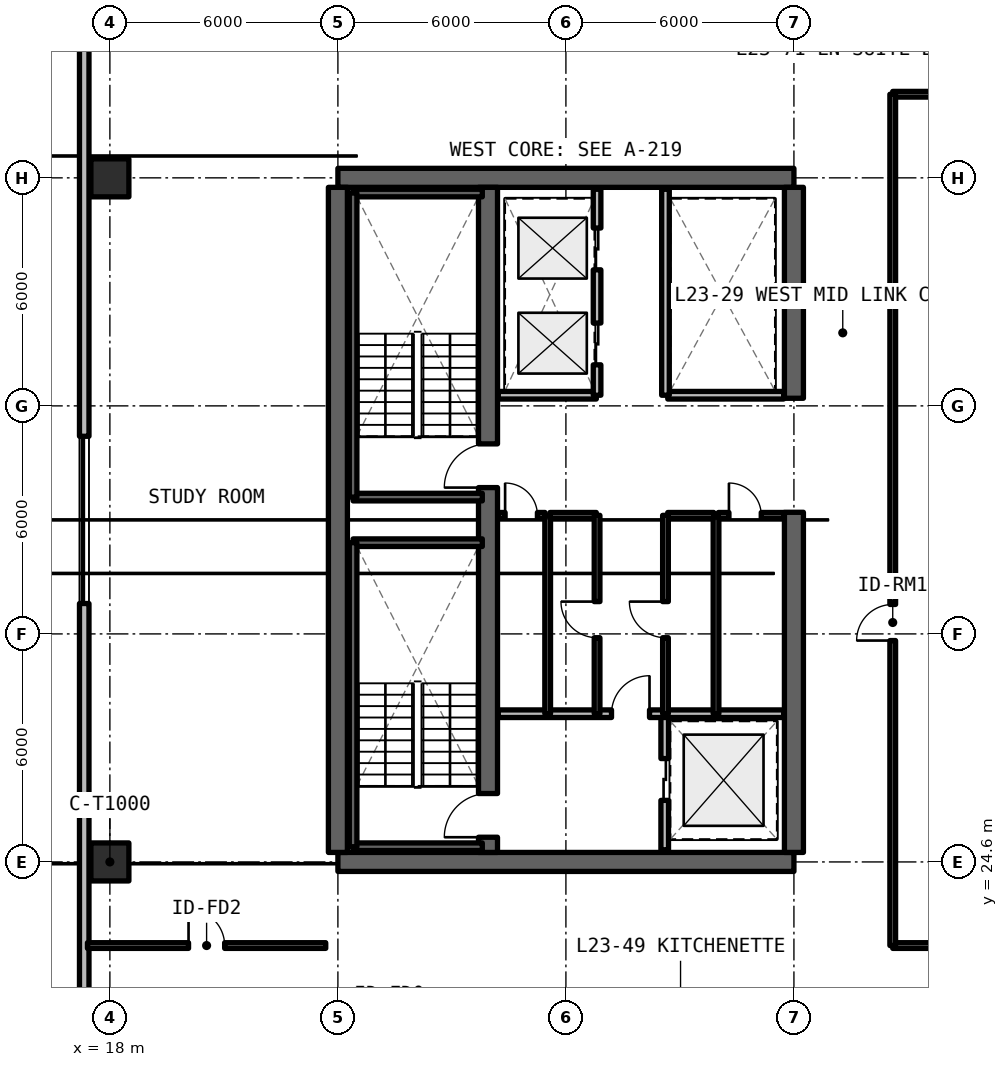
"""IFC4 building model, lengths in metres.
Left out: names, types, materials, properties, quantities, classifications, styles, units other than length and angle.
Written with IfcOpenShell. Run it as: python <this file> out.ifc"""

import sys

from ifc_helpers import new_model, si_unit, direction, frame, frame_2d, origin, origin_2d, place, context, subcontext, project, spatial, rectangle, extrude, element, fill, save


model = new_model("IFC4")
c1 = context("Model", 3, precision=1e-05, world=origin(), true_north=direction((0.0, 1.0)))
c2 = subcontext(c1, "Body", "Model", "MODEL_VIEW")
j1 = project(units=[si_unit("LENGTHUNIT", "METRE"), si_unit("PLANEANGLEUNIT", "RADIAN")], contexts=[c1])
p1 = place(None, origin())
s1 = spatial("IfcSite", under=j1, at=p1, CompositionType="ELEMENT")
p2 = place(p1, origin())
s2 = spatial("IfcBuilding", under=s1, at=p2, CompositionType="ELEMENT")
p3 = place(p2, frame((0.0, 0.0, 85.47)))
s3 = spatial("IfcBuildingStorey", under=s2, at=p3, CompositionType="ELEMENT", Elevation=85.47)
for number, where, z_axis, x_axis in (
    (1, (24.0, 24.6, 0.0), (0.0, 0.0, 1.0), (1.0, 0.0, 0.0)),
    (2, (36.0, 42.6, 0.0), (0.0, 0.0, 1.0), (-1.0, 0.0, 0.0)),
):
    element("IfcWall", number, at=place(p3, frame(where, z_axis=z_axis, x_axis=x_axis)), inside=s3, PredefinedType="SHEAR", context=c2, shape_type="SweptSolid", body=[
        extrude(rectangle(XDim=12.0, YDim=0.5, at=frame_2d((6.0, 0.0))), origin(), (0.0, 0.0, 1.0), 3.3),
    ])
p4 = place(p3, frame((24.0, 24.85, 0.0), z_axis=(0.0, 0.0, 1.0), x_axis=(0.0, 1.0, 0.0)))
e3 = element("IfcWall", 3, at=p4, inside=s3, PredefinedType="SHEAR", context=c2, shape_type="SweptSolid", body=[
    extrude(rectangle(XDim=17.5, YDim=0.5, at=frame_2d((8.75, 0.0))), origin(), (0.0, 0.0, 1.0), 3.3),
])
p5 = place(p3, frame((36.0, 24.85, 0.0), z_axis=(0.0, 0.0, 1.0), x_axis=(0.0, 1.0, 0.0)))
e4 = element("IfcWall", 4, at=p5, inside=s3, PredefinedType="SHEAR", context=c2, shape_type="SweptSolid", body=[
    extrude(rectangle(XDim=8.95, YDim=0.5, at=frame_2d((4.475, 0.0))), origin(), (0.0, 0.0, 1.0), 3.3),
])
p6 = place(p3, frame((36.0, 36.8, 0.0), z_axis=(0.0, 0.0, 1.0), x_axis=(0.0, 1.0, 0.0)))
e5 = element("IfcWall", 5, at=p6, inside=s3, PredefinedType="SHEAR", context=c2, shape_type="SweptSolid", body=[
    extrude(rectangle(XDim=5.55, YDim=0.5, at=frame_2d((2.775, 0.0))), origin(), (0.0, 0.0, 1.0), 3.3),
])
p7 = place(p3, frame((27.95, 24.85, 0.0), z_axis=(0.0, 0.0, 1.0), x_axis=(0.0, 1.0, 0.0)))
e6 = element("IfcWall", 6, at=p7, inside=s3, PredefinedType="SHEAR", context=c2, shape_type="SweptSolid", body=[
    extrude(rectangle(XDim=17.5, YDim=0.5, at=frame_2d((8.75, 0.0))), origin(), (0.0, 0.0, 1.0), 3.3),
])
p8 = place(p7, frame((0.4, 0.0, 0.0)))
e7 = element("IfcOpeningElement", 7, at=p8, cuts=e6, PredefinedType="OPENING", context=c2, shape_type="SweptSolid", body=[
    extrude(rectangle(XDim=1.15, YDim=2.15, at=frame_2d((0.575, 1.075))), frame((0.0, 0.26, 0.0), z_axis=(0.0, -1.0, 0.0), x_axis=(1.0, 0.0, 0.0)), (0.0, 0.0, 1.0), 0.52),
])
p9 = place(p7, frame((9.6, 0.0, 0.0)))
e8 = element("IfcOpeningElement", 8, at=p9, cuts=e6, PredefinedType="OPENING", context=c2, shape_type="SweptSolid", body=[
    extrude(rectangle(XDim=1.15, YDim=2.15, at=frame_2d((0.575, 1.075))), frame((0.0, 0.26, 0.0), z_axis=(0.0, -1.0, 0.0), x_axis=(1.0, 0.0, 0.0)), (0.0, 0.0, 1.0), 0.52),
])
for number, where, z_axis, x_axis in (
    (9, (18.0, 24.6, 0.0), (0.0, 0.0, 1.0), (1.0, 0.0, 0.0)),
    (10, (18.0, 42.6, 0.0), (0.0, 0.0, 1.0), (1.0, 0.0, 0.0)),
):
    element("IfcColumn", number, at=place(p3, frame(where, z_axis=z_axis, x_axis=x_axis)), inside=s3, PredefinedType="COLUMN", context=c2, shape_type="SweptSolid", body=[
        extrude(rectangle(XDim=1.0, YDim=1.0, at=origin_2d()), origin(), (0.0, 0.0, 1.0), 3.3),
    ])
p10 = place(p3, frame((17.325, 53.348, 0.0), z_axis=(0.0, 0.0, 1.0), x_axis=(0.0, -1.0, 0.0)))
e11 = element("IfcWall", 11, at=p10, inside=s3, PredefinedType="SOLIDWALL", context=c2, shape_type="SweptSolid", body=[
    extrude(rectangle(XDim=39.496, YDim=0.25, at=frame_2d((19.748, 0.0))), origin(), (0.0, 0.0, 1.0), 3.08),
])
p11 = place(p10, frame((1.698, 0.0, 0.0)))
e12 = element("IfcOpeningElement", 12, at=p11, cuts=e11, PredefinedType="OPENING", context=c2, shape_type="SweptSolid", body=[
    extrude(rectangle(XDim=1.1, YDim=2.15, at=frame_2d((0.55, 1.075))), frame((0.0, 0.135, 0.0), z_axis=(0.0, -1.0, 0.0), x_axis=(1.0, 0.0, 0.0)), (0.0, 0.0, 1.0), 0.27),
])
p12 = place(p10, frame((17.548, 0.0, 0.78)))
e13 = element("IfcOpeningElement", 13, at=p12, cuts=e11, PredefinedType="OPENING", context=c2, shape_type="SweptSolid", body=[
    extrude(rectangle(XDim=4.4, YDim=1.66, at=frame_2d((2.2, 0.83))), frame((0.0, 0.135, 0.0), z_axis=(0.0, -1.0, 0.0), x_axis=(1.0, 0.0, 0.0)), (0.0, 0.0, 1.0), 0.27),
])
p13 = place(p10, frame((35.642, 0.0, 0.78)))
e14 = element("IfcOpeningElement", 14, at=p13, cuts=e11, PredefinedType="OPENING", context=c2, shape_type="SweptSolid", body=[
    extrude(rectangle(XDim=1.4, YDim=1.65, at=frame_2d((0.7, 0.825))), frame((0.0, 0.135, 0.0), z_axis=(0.0, -1.0, 0.0), x_axis=(1.0, 0.0, 0.0)), (0.0, 0.0, 1.0), 0.27),
])
p14 = place(p3, frame((32.6, 24.92, 0.0), z_axis=(0.0, 0.0, 1.0), x_axis=(0.0, 1.0, 0.0)))
e15 = element("IfcWall", 15, at=p14, inside=s3, PredefinedType="SOLIDWALL", context=c2, shape_type="SweptSolid", body=[
    extrude(rectangle(XDim=3.58, YDim=0.2, at=frame_2d((1.79, 0.0))), origin(), (0.0, 0.0, 1.0), 2.35),
])
p15 = place(p14, frame((1.3, 0.0, 0.0)))
e16 = element("IfcOpeningElement", 16, at=p15, cuts=e15, PredefinedType="OPENING", context=c2, shape_type="SweptSolid", body=[
    extrude(rectangle(XDim=1.1, YDim=2.2, at=frame_2d((0.55, 1.1))), frame((0.0, 0.11, 0.0), z_axis=(0.0, -1.0, 0.0), x_axis=(1.0, 0.0, 0.0)), (0.0, 0.0, 1.0), 0.22),
])
p16 = place(p3, frame((28.22, 28.5, 0.0), z_axis=(0.0, 0.0, 1.0), x_axis=(1.0, 0.0, 0.0)))
e17 = element("IfcWall", 17, at=p16, inside=s3, PredefinedType="SOLIDWALL", context=c2, shape_type="SweptSolid", body=[
    extrude(rectangle(XDim=7.51, YDim=0.2, at=frame_2d((3.755, 0.0))), origin(), (0.0, 0.0, 1.0), 2.35),
])
p17 = place(p16, frame((2.98, 0.0, 0.0)))
e18 = element("IfcOpeningElement", 18, at=p17, cuts=e17, PredefinedType="OPENING", context=c2, shape_type="SweptSolid", body=[
    extrude(rectangle(XDim=1.0, YDim=2.15, at=frame_2d((0.5, 1.075))), frame((0.0, 0.11, 0.0), z_axis=(0.0, -1.0, 0.0), x_axis=(1.0, 0.0, 0.0)), (0.0, 0.0, 1.0), 0.22),
])
p18 = place(p3, frame((29.52, 28.5, 0.0), z_axis=(0.0, 0.0, 1.0), x_axis=(0.0, 1.0, 0.0)))
e19 = element("IfcWall", 19, at=p18, inside=s3, PredefinedType="SOLIDWALL", context=c2, shape_type="SweptSolid", body=[
    extrude(rectangle(XDim=5.22, YDim=0.15, at=frame_2d((2.61, 0.0))), origin(), (0.0, 0.0, 1.0), 2.35),
])
p19 = place(p3, frame((28.22, 33.72, 0.0), z_axis=(0.0, 0.0, 1.0), x_axis=(1.0, 0.0, 0.0)))
e20 = element("IfcWall", 20, at=p19, inside=s3, PredefinedType="SOLIDWALL", context=c2, shape_type="SweptSolid", body=[
    extrude(rectangle(XDim=1.23, YDim=0.15, at=frame_2d((0.615, 0.0))), origin(), (0.0, 0.0, 1.0), 2.35),
])
p20 = place(p19, frame((0.18, 0.0, 0.0)))
e21 = element("IfcOpeningElement", 21, at=p20, cuts=e20, PredefinedType="OPENING", context=c2, shape_type="SweptSolid", body=[
    extrude(rectangle(XDim=0.85, YDim=2.1, at=frame_2d((0.425, 1.05))), frame((0.0, 0.085, 0.0), z_axis=(0.0, -1.0, 0.0), x_axis=(1.0, 0.0, 0.0)), (0.0, 0.0, 1.0), 0.17),
])
p21 = place(p3, frame((29.58, 33.72, 0.0), z_axis=(0.0, 0.0, 1.0), x_axis=(1.0, 0.0, 0.0)))
e22 = element("IfcWall", 22, at=p21, inside=s3, PredefinedType="SOLIDWALL", context=c2, shape_type="SweptSolid", body=[
    extrude(rectangle(XDim=1.22, YDim=0.15, at=frame_2d((0.61, 0.0))), origin(), (0.0, 0.0, 1.0), 2.35),
])
p22 = place(p3, frame((30.82, 28.5, 0.0), z_axis=(0.0, 0.0, 1.0), x_axis=(0.0, 1.0, 0.0)))
e23 = element("IfcWall", 23, at=p22, inside=s3, PredefinedType="SOLIDWALL", context=c2, shape_type="SweptSolid", body=[
    extrude(rectangle(XDim=5.22, YDim=0.15, at=frame_2d((2.61, 0.0))), origin(), (0.0, 0.0, 1.0), 2.35),
])
p23 = place(p22, frame((2.0, 0.0, 0.0)))
e24 = element("IfcOpeningElement", 24, at=p23, cuts=e23, PredefinedType="OPENING", context=c2, shape_type="SweptSolid", body=[
    extrude(rectangle(XDim=0.95, YDim=2.15, at=frame_2d((0.475, 1.075))), frame((0.0, 0.085, 0.0), z_axis=(0.0, -1.0, 0.0), x_axis=(1.0, 0.0, 0.0)), (0.0, 0.0, 1.0), 0.17),
])
p24 = place(p3, frame((33.95, 28.5, 0.0), z_axis=(0.0, 0.0, 1.0), x_axis=(0.0, 1.0, 0.0)))
e25 = element("IfcWall", 25, at=p24, inside=s3, PredefinedType="SOLIDWALL", context=c2, shape_type="SweptSolid", body=[
    extrude(rectangle(XDim=5.22, YDim=0.15, at=frame_2d((2.61, 0.0))), origin(), (0.0, 0.0, 1.0), 2.35),
])
p25 = place(p3, frame((32.68, 33.72, 0.0), z_axis=(0.0, 0.0, 1.0), x_axis=(1.0, 0.0, 0.0)))
e26 = element("IfcWall", 26, at=p25, inside=s3, PredefinedType="SOLIDWALL", context=c2, shape_type="SweptSolid", body=[
    extrude(rectangle(XDim=1.21, YDim=0.15, at=frame_2d((0.605, 0.0))), origin(), (0.0, 0.0, 1.0), 2.35),
])
p26 = place(p3, frame((34.01, 33.72, 0.0), z_axis=(0.0, 0.0, 1.0), x_axis=(1.0, 0.0, 0.0)))
e27 = element("IfcWall", 27, at=p26, inside=s3, PredefinedType="SOLIDWALL", context=c2, shape_type="SweptSolid", body=[
    extrude(rectangle(XDim=1.72, YDim=0.15, at=frame_2d((0.86, 0.0))), origin(), (0.0, 0.0, 1.0), 2.35),
])
p27 = place(p26, frame((0.28, 0.0, 0.0)))
e28 = element("IfcOpeningElement", 28, at=p27, cuts=e27, PredefinedType="OPENING", context=c2, shape_type="SweptSolid", body=[
    extrude(rectangle(XDim=0.85, YDim=2.1, at=frame_2d((0.425, 1.05))), frame((0.0, 0.085, 0.0), z_axis=(0.0, -1.0, 0.0), x_axis=(1.0, 0.0, 0.0)), (0.0, 0.0, 1.0), 0.17),
])
p28 = place(p3, frame((32.62, 28.5, 0.0), z_axis=(0.0, 0.0, 1.0), x_axis=(0.0, 1.0, 0.0)))
e29 = element("IfcWall", 29, at=p28, inside=s3, PredefinedType="SOLIDWALL", context=c2, shape_type="SweptSolid", body=[
    extrude(rectangle(XDim=5.22, YDim=0.15, at=frame_2d((2.61, 0.0))), origin(), (0.0, 0.0, 1.0), 2.35),
])
p29 = place(p28, frame((2.0, 0.0, 0.0)))
e30 = element("IfcOpeningElement", 30, at=p29, cuts=e29, PredefinedType="OPENING", context=c2, shape_type="SweptSolid", body=[
    extrude(rectangle(XDim=0.95, YDim=2.15, at=frame_2d((0.475, 1.075))), frame((0.0, 0.085, 0.0), z_axis=(0.0, -1.0, 0.0), x_axis=(1.0, 0.0, 0.0)), (0.0, 0.0, 1.0), 0.17),
])
p30 = place(p3, frame((28.22, 36.88, 0.0), z_axis=(0.0, 0.0, 1.0), x_axis=(1.0, 0.0, 0.0)))
e31 = element("IfcWall", 31, at=p30, inside=s3, PredefinedType="SOLIDWALL", context=c2, shape_type="SweptSolid", body=[
    extrude(rectangle(XDim=2.58, YDim=0.2, at=frame_2d((1.29, 0.0))), origin(), (0.0, 0.0, 1.0), 2.35),
])
p31 = place(p3, frame((30.82, 36.88, 0.0), z_axis=(0.0, 0.0, 1.0), x_axis=(0.0, 1.0, 0.0)))
e32 = element("IfcWall", 32, at=p31, inside=s3, PredefinedType="SOLIDWALL", context=c2, shape_type="SweptSolid", body=[
    extrude(rectangle(XDim=5.42, YDim=0.2, at=frame_2d((2.71, 0.0))), origin(), (0.0, 0.0, 1.0), 2.35),
])
p32 = place(p31, frame((0.8, 0.0, 0.0)))
e33 = element("IfcOpeningElement", 33, at=p32, cuts=e32, PredefinedType="OPENING", context=c2, shape_type="SweptSolid", body=[
    extrude(rectangle(XDim=1.1, YDim=2.2, at=frame_2d((0.55, 1.1))), frame((0.0, 0.11, 0.0), z_axis=(0.0, -1.0, 0.0), x_axis=(1.0, 0.0, 0.0)), (0.0, 0.0, 1.0), 0.22),
])
p33 = place(p31, frame((3.3, 0.0, 0.0)))
e34 = element("IfcOpeningElement", 34, at=p33, cuts=e32, PredefinedType="OPENING", context=c2, shape_type="SweptSolid", body=[
    extrude(rectangle(XDim=1.1, YDim=2.2, at=frame_2d((0.55, 1.1))), frame((0.0, 0.11, 0.0), z_axis=(0.0, -1.0, 0.0), x_axis=(1.0, 0.0, 0.0)), (0.0, 0.0, 1.0), 0.22),
])
p34 = place(p3, frame((32.68, 36.88, 0.0), z_axis=(0.0, 0.0, 1.0), x_axis=(1.0, 0.0, 0.0)))
e35 = element("IfcWall", 35, at=p34, inside=s3, PredefinedType="SOLIDWALL", context=c2, shape_type="SweptSolid", body=[
    extrude(rectangle(XDim=3.05, YDim=0.2, at=frame_2d((1.525, 0.0))), origin(), (0.0, 0.0, 1.0), 2.35),
])
p35 = place(p3, frame((32.62, 36.88, 0.0), z_axis=(0.0, 0.0, 1.0), x_axis=(0.0, 1.0, 0.0)))
e36 = element("IfcWall", 36, at=p35, inside=s3, PredefinedType="SOLIDWALL", context=c2, shape_type="SweptSolid", body=[
    extrude(rectangle(XDim=5.42, YDim=0.2, at=frame_2d((2.71, 0.0))), origin(), (0.0, 0.0, 1.0), 2.35),
])
for number, where, z_axis, x_axis in (
    (37, (38.6, 22.4, 0.0), (0.0, 0.0, 1.0), (1.0, 0.0, 0.0)),
    (38, (38.6, 44.8, 0.0), (0.0, 0.0, 1.0), (1.0, 0.0, 0.0)),
):
    element("IfcWall", number, at=place(p3, frame(where, z_axis=z_axis, x_axis=x_axis)), inside=s3, PredefinedType="SOLIDWALL", context=c2, shape_type="SweptSolid", body=[
        extrude(rectangle(XDim=8.25, YDim=0.15, at=frame_2d((4.125, 0.0))), origin(), (0.0, 0.0, 1.0), 2.35),
    ])
p36 = place(p3, frame((38.6, 22.4, 0.0), z_axis=(0.0, 0.0, 1.0), x_axis=(0.0, 1.0, 0.0)))
e39 = element("IfcWall", 39, at=p36, inside=s3, PredefinedType="SOLIDWALL", context=c2, shape_type="SweptSolid", body=[
    extrude(rectangle(XDim=22.4, YDim=0.15, at=frame_2d((11.2, 0.0))), origin(), (0.0, 0.0, 1.0), 2.35),
])
p37 = place(p36, frame((8.025, 0.0, 0.0)))
e40 = element("IfcOpeningElement", 40, at=p37, cuts=e39, PredefinedType="OPENING", context=c2, shape_type="SweptSolid", body=[
    extrude(rectangle(XDim=0.95, YDim=2.15, at=frame_2d((0.475, 1.075))), frame((0.0, 0.085, 0.0), z_axis=(0.0, -1.0, 0.0), x_axis=(1.0, 0.0, 0.0)), (0.0, 0.0, 1.0), 0.17),
])
p38 = place(p3, frame((17.41, 22.4, 0.0), z_axis=(0.0, 0.0, 1.0), x_axis=(1.0, 0.0, 0.0)))
e41 = element("IfcWall", 41, at=p38, inside=s3, PredefinedType="SOLIDWALL", context=c2, shape_type="SweptSolid", body=[
    extrude(rectangle(XDim=6.27, YDim=0.15, at=frame_2d((3.135, 0.0))), origin(), (0.0, 0.0, 1.0), 2.35),
])
p39 = place(p38, frame((2.66, 0.0, 0.0)))
e42 = element("IfcOpeningElement", 42, at=p39, cuts=e41, PredefinedType="OPENING", context=c2, shape_type="SweptSolid", body=[
    extrude(rectangle(XDim=0.95, YDim=2.15, at=frame_2d((0.475, 1.075))), frame((0.0, 0.085, 0.0), z_axis=(0.0, -1.0, 0.0), x_axis=(1.0, 0.0, 0.0)), (0.0, 0.0, 1.0), 0.17),
])
for number, where, z_axis, x_axis in (
    (43, (24.4, 25.0, 0.0), (0.0, 0.0, 1.0), (1.0, 0.0, 0.0)),
    (44, (27.8, 33.0, 0.0), (0.0, 0.0, 1.0), (-1.0, 0.0, 0.0)),
):
    element("IfcWall", number, at=place(p3, frame(where, z_axis=z_axis, x_axis=x_axis)), inside=s3, PredefinedType="SOLIDWALL", context=c2, shape_type="SweptSolid", body=[
        extrude(rectangle(XDim=3.4, YDim=0.2, at=frame_2d((1.7, 0.0))), origin(), (0.0, 0.0, 1.0), 3.3),
    ])
p40 = place(p3, frame((24.4, 33.0, 0.0), z_axis=(0.0, 0.0, 1.0), x_axis=(0.0, -1.0, 0.0)))
e45 = element("IfcWall", 45, at=p40, inside=s3, PredefinedType="SOLIDWALL", context=c2, shape_type="SweptSolid", body=[
    extrude(rectangle(XDim=8.0, YDim=0.2, at=frame_2d((4.0, 0.0))), origin(), (0.0, 0.0, 1.0), 3.3),
])
for number, where, z_axis, x_axis in (
    (46, (24.4, 34.2, 0.0), (0.0, 0.0, 1.0), (1.0, 0.0, 0.0)),
    (47, (27.8, 42.2, 0.0), (0.0, 0.0, 1.0), (-1.0, 0.0, 0.0)),
):
    element("IfcWall", number, at=place(p3, frame(where, z_axis=z_axis, x_axis=x_axis)), inside=s3, PredefinedType="SOLIDWALL", context=c2, shape_type="SweptSolid", body=[
        extrude(rectangle(XDim=3.4, YDim=0.2, at=frame_2d((1.7, 0.0))), origin(), (0.0, 0.0, 1.0), 3.3),
    ])
p41 = place(p3, frame((24.4, 42.2, 0.0), z_axis=(0.0, 0.0, 1.0), x_axis=(0.0, -1.0, 0.0)))
e48 = element("IfcWall", 48, at=p41, inside=s3, PredefinedType="SOLIDWALL", context=c2, shape_type="SweptSolid", body=[
    extrude(rectangle(XDim=8.0, YDim=0.2, at=frame_2d((4.0, 0.0))), origin(), (0.0, 0.0, 1.0), 3.3),
])
p42 = place(p12, origin())
e49 = element("IfcWindow", 49, at=p42, inside=s3, PartitioningType="SINGLE_PANEL", PredefinedType="WINDOW", context=c2, shape_type="SweptSolid", body=[
    extrude(rectangle(XDim=4.4, YDim=1.66, at=frame_2d((2.2, 0.83))), frame((0.0, 0.03, 0.0), z_axis=(0.0, -1.0, 0.0), x_axis=(1.0, 0.0, 0.0)), (0.0, 0.0, 1.0), 0.06),
])
fill(e13, e49)
p43 = place(p15, origin())
e50 = element("IfcDoor", 50, at=p43, inside=s3, OperationType="SLIDING_TO_LEFT", PredefinedType="DOOR", context=c2, shape_type="SweptSolid", body=[
    extrude(rectangle(XDim=1.1, YDim=2.2, at=frame_2d((0.55, 1.1))), frame((0.0, 0.025, 0.0), z_axis=(0.0, -1.0, 0.0), x_axis=(1.0, 0.0, 0.0)), (0.0, 0.0, 1.0), 0.05),
])
fill(e16, e50)
p44 = place(p17, origin())
e51 = element("IfcDoor", 51, at=p44, inside=s3, OperationType="SINGLE_SWING_RIGHT", PredefinedType="DOOR", context=c2, shape_type="SweptSolid", body=[
    extrude(rectangle(XDim=1.0, YDim=2.15, at=frame_2d((0.5, 1.075))), frame((0.0, 0.025, 0.0), z_axis=(0.0, -1.0, 0.0), x_axis=(1.0, 0.0, 0.0)), (0.0, 0.0, 1.0), 0.05),
])
fill(e18, e51)
p45 = place(p20, origin())
e52 = element("IfcDoor", 52, at=p45, inside=s3, OperationType="SINGLE_SWING_LEFT", PredefinedType="DOOR", context=c2, shape_type="SweptSolid", body=[
    extrude(rectangle(XDim=0.85, YDim=2.1, at=frame_2d((0.425, 1.05))), frame((0.0, 0.025, 0.0), z_axis=(0.0, -1.0, 0.0), x_axis=(1.0, 0.0, 0.0)), (0.0, 0.0, 1.0), 0.05),
])
fill(e21, e52)
p46 = place(p23, origin())
e53 = element("IfcDoor", 53, at=p46, inside=s3, OperationType="SINGLE_SWING_RIGHT", PredefinedType="DOOR", context=c2, shape_type="SweptSolid", body=[
    extrude(rectangle(XDim=0.95, YDim=2.15, at=frame_2d((0.475, 1.075))), frame((0.0, 0.025, 0.0), z_axis=(0.0, -1.0, 0.0), x_axis=(1.0, 0.0, 0.0)), (0.0, 0.0, 1.0), 0.05),
])
fill(e24, e53)
p47 = place(p27, origin())
e54 = element("IfcDoor", 54, at=p47, inside=s3, OperationType="SINGLE_SWING_LEFT", PredefinedType="DOOR", context=c2, shape_type="SweptSolid", body=[
    extrude(rectangle(XDim=0.85, YDim=2.1, at=frame_2d((0.425, 1.05))), frame((0.0, 0.025, 0.0), z_axis=(0.0, -1.0, 0.0), x_axis=(1.0, 0.0, 0.0)), (0.0, 0.0, 1.0), 0.05),
])
fill(e28, e54)
p48 = place(p29, origin())
e55 = element("IfcDoor", 55, at=p48, inside=s3, OperationType="SINGLE_SWING_RIGHT", PredefinedType="DOOR", context=c2, shape_type="SweptSolid", body=[
    extrude(rectangle(XDim=0.95, YDim=2.15, at=frame_2d((0.475, 1.075))), frame((0.0, 0.025, 0.0), z_axis=(0.0, -1.0, 0.0), x_axis=(1.0, 0.0, 0.0)), (0.0, 0.0, 1.0), 0.05),
])
fill(e30, e55)
p49 = place(p32, origin())
e56 = element("IfcDoor", 56, at=p49, inside=s3, OperationType="SLIDING_TO_LEFT", PredefinedType="DOOR", context=c2, shape_type="SweptSolid", body=[
    extrude(rectangle(XDim=1.1, YDim=2.2, at=frame_2d((0.55, 1.1))), frame((0.0, 0.025, 0.0), z_axis=(0.0, -1.0, 0.0), x_axis=(1.0, 0.0, 0.0)), (0.0, 0.0, 1.0), 0.05),
])
fill(e33, e56)
p50 = place(p33, origin())
e57 = element("IfcDoor", 57, at=p50, inside=s3, OperationType="SLIDING_TO_RIGHT", PredefinedType="DOOR", context=c2, shape_type="SweptSolid", body=[
    extrude(rectangle(XDim=1.1, YDim=2.2, at=frame_2d((0.55, 1.1))), frame((0.0, 0.025, 0.0), z_axis=(0.0, -1.0, 0.0), x_axis=(1.0, 0.0, 0.0)), (0.0, 0.0, 1.0), 0.05),
])
fill(e34, e57)
p51 = place(p37, origin())
e58 = element("IfcDoor", 58, at=p51, inside=s3, OperationType="SINGLE_SWING_LEFT", PredefinedType="DOOR", context=c2, shape_type="SweptSolid", body=[
    extrude(rectangle(XDim=0.95, YDim=2.15, at=frame_2d((0.475, 1.075))), frame((0.0, 0.025, 0.0), z_axis=(0.0, -1.0, 0.0), x_axis=(1.0, 0.0, 0.0)), (0.0, 0.0, 1.0), 0.05),
])
fill(e40, e58)
p52 = place(p39, origin())
e59 = element("IfcDoor", 59, at=p52, inside=s3, OperationType="SINGLE_SWING_LEFT", PredefinedType="DOOR", context=c2, shape_type="SweptSolid", body=[
    extrude(rectangle(XDim=0.95, YDim=2.15, at=frame_2d((0.475, 1.075))), frame((0.0, 0.025, 0.0), z_axis=(0.0, -1.0, 0.0), x_axis=(1.0, 0.0, 0.0)), (0.0, 0.0, 1.0), 0.05),
])
fill(e42, e59)
p53 = place(p8, origin())
e60 = element("IfcDoor", 60, at=p53, inside=s3, OperationType="SINGLE_SWING_LEFT", PredefinedType="DOOR", context=c2, shape_type="SweptSolid", body=[
    extrude(rectangle(XDim=1.15, YDim=2.15, at=frame_2d((0.575, 1.075))), frame((0.0, 0.025, 0.0), z_axis=(0.0, -1.0, 0.0), x_axis=(1.0, 0.0, 0.0)), (0.0, 0.0, 1.0), 0.05),
])
fill(e7, e60)
p54 = place(p9, origin())
e61 = element("IfcDoor", 61, at=p54, inside=s3, OperationType="SINGLE_SWING_RIGHT", PredefinedType="DOOR", context=c2, shape_type="SweptSolid", body=[
    extrude(rectangle(XDim=1.15, YDim=2.15, at=frame_2d((0.575, 1.075))), frame((0.0, 0.025, 0.0), z_axis=(0.0, -1.0, 0.0), x_axis=(1.0, 0.0, 0.0)), (0.0, 0.0, 1.0), 0.05),
])
fill(e8, e61)
save(model, sys.argv[1])
